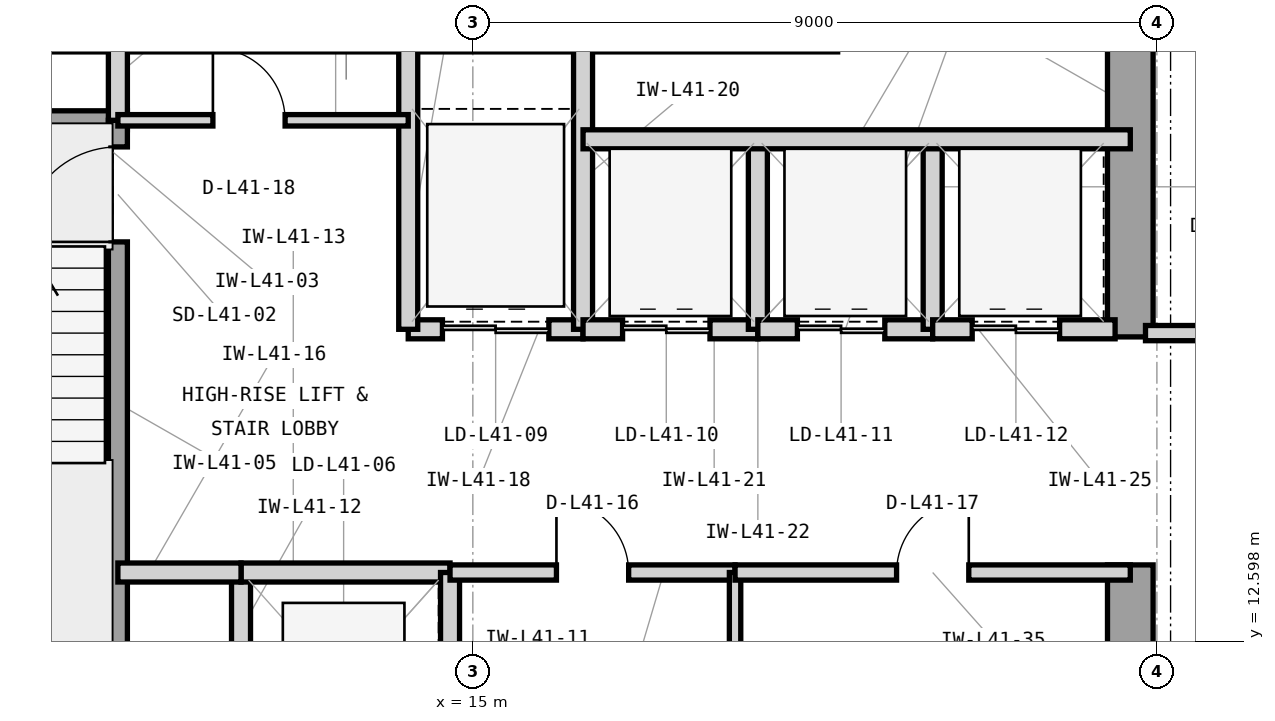
"""IFC4 building model, lengths in metres.
Left out: names, types, materials, properties, quantities, classifications, styles, units other than length and angle.
Written with IfcOpenShell. Run it as: python <this file> out.ifc"""

import sys

from ifc_helpers import new_model, si_unit, direction, frame, frame_2d, origin, place, context, subcontext, project, spatial, rectangle, extrude, element, fill, save


model = new_model("IFC4")
c1 = context("Model", 3, precision=1e-05, world=origin(), true_north=direction((0.0, 1.0)))
c2 = subcontext(c1, "Body", "Model", "MODEL_VIEW")
j1 = project(units=[si_unit("LENGTHUNIT", "METRE"), si_unit("PLANEANGLEUNIT", "RADIAN")], contexts=[c1])
p1 = place(None, origin())
s1 = spatial("IfcSite", under=j1, at=p1, CompositionType="ELEMENT")
p2 = place(p1, origin())
s2 = spatial("IfcBuilding", under=s1, at=p2, CompositionType="ELEMENT")
p3 = place(p2, frame((0.0, 0.0, 172.2)))
s3 = spatial("IfcBuildingStorey", under=s2, at=p3, CompositionType="ELEMENT", Elevation=172.2)
p4 = place(p3, frame((7.475, 20.65, 0.0), z_axis=(0.0, 0.0, 1.0), x_axis=(1.0, 0.0, 0.0)))
e1 = element("IfcWall", 1, at=p4, inside=s3, PredefinedType="SHEAR", context=c2, shape_type="SweptSolid", body=[
    extrude(rectangle(XDim=12.325, YDim=0.6, at=frame_2d((6.163, 0.0))), origin(), (0.0, 0.0, 1.0), 3.9),
])
p5 = place(p3, frame((23.65, 10.4, 0.0), z_axis=(0.0, 0.0, 1.0), x_axis=(0.0, 1.0, 0.0)))
e2 = element("IfcWall", 2, at=p5, inside=s3, PredefinedType="SHEAR", context=c2, shape_type="SweptSolid", body=[
    extrude(rectangle(XDim=3.2, YDim=0.6, at=frame_2d((1.6, 0.0))), origin(), (0.0, 0.0, 1.0), 3.9),
])
p6 = place(p3, frame((23.65, 16.6, 0.0), z_axis=(0.0, 0.0, 1.0), x_axis=(0.0, 1.0, 0.0)))
e3 = element("IfcWall", 3, at=p6, inside=s3, PredefinedType="SHEAR", context=c2, shape_type="SweptSolid", body=[
    extrude(rectangle(XDim=4.05, YDim=0.6, at=frame_2d((2.025, 0.0))), origin(), (0.0, 0.0, 1.0), 3.9),
])
p7 = place(p3, frame((7.7, 19.45, 0.0), z_axis=(0.0, 0.0, 1.0), x_axis=(1.0, 0.0, 0.0)))
e4 = element("IfcWall", 4, at=p7, inside=s3, PredefinedType="SHEAR", context=c2, shape_type="SweptSolid", body=[
    extrude(rectangle(XDim=2.755, YDim=0.25, at=frame_2d((1.377, 0.0))), origin(), (0.0, 0.0, 1.0), 3.9),
])
p8 = place(p3, frame((10.33, 12.0, 0.0), z_axis=(0.0, 0.0, 1.0), x_axis=(0.0, 1.0, 0.0)))
e5 = element("IfcWall", 5, at=p8, inside=s3, PredefinedType="SHEAR", context=c2, shape_type="SweptSolid", body=[
    extrude(rectangle(XDim=7.45, YDim=0.25, at=frame_2d((3.725, 0.0))), origin(), (0.0, 0.0, 1.0), 3.9),
])
p9 = place(p8, frame((5.85, 0.0, 0.0)))
e6 = element("IfcOpeningElement", 6, at=p9, cuts=e5, PredefinedType="OPENING", context=c2, shape_type="SweptSolid", body=[
    extrude(rectangle(XDim=1.25, YDim=2.2, at=frame_2d((0.625, 1.1))), frame((0.0, 0.135, 0.0), z_axis=(0.0, -1.0, 0.0), x_axis=(1.0, 0.0, 0.0)), (0.0, 0.0, 1.0), 0.27),
])
p10 = place(p3, frame((10.33, 19.45, 0.0), z_axis=(0.0, 0.0, 1.0), x_axis=(0.0, 1.0, 0.0)))
e7 = element("IfcWall", 7, at=p10, inside=s3, PredefinedType="PARTITIONING", context=c2, shape_type="SweptSolid", body=[
    extrude(rectangle(XDim=1.2, YDim=0.25, at=frame_2d((0.6, 0.0))), origin(), (0.0, 0.0, 1.0), 3.073),
])
p11 = place(p3, frame((11.95, 10.5, 0.0), z_axis=(0.0, 0.0, 1.0), x_axis=(0.0, 1.0, 0.0)))
e8 = element("IfcWall", 8, at=p11, inside=s3, PredefinedType="PARTITIONING", context=c2, shape_type="SweptSolid", body=[
    extrude(rectangle(XDim=3.0, YDim=0.25, at=frame_2d((1.5, 0.0))), origin(), (0.0, 0.0, 1.0), 3.69),
])
p12 = place(p3, frame((11.95, 13.5, 0.0), z_axis=(0.0, 0.0, 1.0), x_axis=(1.0, 0.0, 0.0)))
e9 = element("IfcWall", 9, at=p12, inside=s3, PredefinedType="PARTITIONING", context=c2, shape_type="SweptSolid", body=[
    extrude(rectangle(XDim=2.75, YDim=0.25, at=frame_2d((1.375, 0.0))), origin(), (0.0, 0.0, 1.0), 3.283),
])
p13 = place(p3, frame((14.7, 10.5, 0.0), z_axis=(0.0, 0.0, 1.0), x_axis=(0.0, 1.0, 0.0)))
e10 = element("IfcWall", 10, at=p13, inside=s3, PredefinedType="PARTITIONING", context=c2, shape_type="SweptSolid", body=[
    extrude(rectangle(XDim=3.0, YDim=0.25, at=frame_2d((1.5, 0.0))), origin(), (0.0, 0.0, 1.0), 3.69),
])
p14 = place(p3, frame((10.33, 13.5, 0.0), z_axis=(0.0, 0.0, 1.0), x_axis=(1.0, 0.0, 0.0)))
e11 = element("IfcWall", 11, at=p14, inside=s3, PredefinedType="PARTITIONING", context=c2, shape_type="SweptSolid", body=[
    extrude(rectangle(XDim=1.62, YDim=0.25, at=frame_2d((0.81, 0.0))), origin(), (0.0, 0.0, 1.0), 3.283),
])
p15 = place(p3, frame((14.15, 16.7, 0.0), z_axis=(0.0, 0.0, 1.0), x_axis=(1.0, 0.0, 0.0)))
e12 = element("IfcWall", 12, at=p15, inside=s3, PredefinedType="PARTITIONING", context=c2, shape_type="SweptSolid", body=[
    extrude(rectangle(XDim=2.3, YDim=0.25, at=frame_2d((1.15, 0.0))), origin(), (0.0, 0.0, 1.0), 3.283),
])
p16 = place(p15, frame((0.45, 0.0, 0.0)))
e13 = element("IfcOpeningElement", 13, at=p16, cuts=e12, PredefinedType="OPENING", context=c2, shape_type="SweptSolid", body=[
    extrude(rectangle(XDim=1.4, YDim=2.35, at=frame_2d((0.7, 1.175))), frame((0.0, 0.135, 0.0), z_axis=(0.0, -1.0, 0.0), x_axis=(1.0, 0.0, 0.0)), (0.0, 0.0, 1.0), 0.27),
])
for number, where, z_axis, x_axis in (
    (14, (14.15, 16.7, 0.0), (0.0, 0.0, 1.0), (0.0, 1.0, 0.0)),
    (15, (16.45, 16.7, 0.0), (0.0, 0.0, 1.0), (0.0, 1.0, 0.0)),
):
    element("IfcWall", number, at=place(p3, frame(where, z_axis=z_axis, x_axis=x_axis)), inside=s3, PredefinedType="PARTITIONING", context=c2, shape_type="SweptSolid", body=[
        extrude(rectangle(XDim=3.95, YDim=0.25, at=frame_2d((1.975, 0.0))), origin(), (0.0, 0.0, 1.0), 3.69),
    ])
p17 = place(p3, frame((16.45, 16.7, 0.0), z_axis=(0.0, 0.0, 1.0), x_axis=(1.0, 0.0, 0.0)))
e16 = element("IfcWall", 16, at=p17, inside=s3, PredefinedType="PARTITIONING", context=c2, shape_type="SweptSolid", body=[
    extrude(rectangle(XDim=2.3, YDim=0.25, at=frame_2d((1.15, 0.0))), origin(), (0.0, 0.0, 1.0), 3.283),
])
p18 = place(p17, frame((0.52, 0.0, 0.0)))
e17 = element("IfcOpeningElement", 17, at=p18, cuts=e16, PredefinedType="OPENING", context=c2, shape_type="SweptSolid", body=[
    extrude(rectangle(XDim=1.15, YDim=2.25, at=frame_2d((0.575, 1.125))), frame((0.0, 0.135, 0.0), z_axis=(0.0, -1.0, 0.0), x_axis=(1.0, 0.0, 0.0)), (0.0, 0.0, 1.0), 0.27),
])
p19 = place(p3, frame((18.75, 16.7, 0.0), z_axis=(0.0, 0.0, 1.0), x_axis=(0.0, 1.0, 0.0)))
e18 = element("IfcWall", 18, at=p19, inside=s3, PredefinedType="PARTITIONING", context=c2, shape_type="SweptSolid", body=[
    extrude(rectangle(XDim=2.5, YDim=0.25, at=frame_2d((1.25, 0.0))), origin(), (0.0, 0.0, 1.0), 3.69),
])
p20 = place(p3, frame((18.75, 16.7, 0.0), z_axis=(0.0, 0.0, 1.0), x_axis=(1.0, 0.0, 0.0)))
e19 = element("IfcWall", 19, at=p20, inside=s3, PredefinedType="PARTITIONING", context=c2, shape_type="SweptSolid", body=[
    extrude(rectangle(XDim=2.3, YDim=0.25, at=frame_2d((1.15, 0.0))), origin(), (0.0, 0.0, 1.0), 3.283),
])
p21 = place(p20, frame((0.52, 0.0, 0.0)))
e20 = element("IfcOpeningElement", 20, at=p21, cuts=e19, PredefinedType="OPENING", context=c2, shape_type="SweptSolid", body=[
    extrude(rectangle(XDim=1.15, YDim=2.25, at=frame_2d((0.575, 1.125))), frame((0.0, 0.135, 0.0), z_axis=(0.0, -1.0, 0.0), x_axis=(1.0, 0.0, 0.0)), (0.0, 0.0, 1.0), 0.27),
])
p22 = place(p3, frame((21.05, 16.7, 0.0), z_axis=(0.0, 0.0, 1.0), x_axis=(0.0, 1.0, 0.0)))
e21 = element("IfcWall", 21, at=p22, inside=s3, PredefinedType="PARTITIONING", context=c2, shape_type="SweptSolid", body=[
    extrude(rectangle(XDim=2.5, YDim=0.25, at=frame_2d((1.25, 0.0))), origin(), (0.0, 0.0, 1.0), 3.69),
])
p23 = place(p3, frame((21.05, 16.7, 0.0), z_axis=(0.0, 0.0, 1.0), x_axis=(1.0, 0.0, 0.0)))
e22 = element("IfcWall", 22, at=p23, inside=s3, PredefinedType="PARTITIONING", context=c2, shape_type="SweptSolid", body=[
    extrude(rectangle(XDim=2.4, YDim=0.25, at=frame_2d((1.2, 0.0))), origin(), (0.0, 0.0, 1.0), 3.283),
])
p24 = place(p23, frame((0.52, 0.0, 0.0)))
e23 = element("IfcOpeningElement", 23, at=p24, cuts=e22, PredefinedType="OPENING", context=c2, shape_type="SweptSolid", body=[
    extrude(rectangle(XDim=1.15, YDim=2.25, at=frame_2d((0.575, 1.125))), frame((0.0, 0.135, 0.0), z_axis=(0.0, -1.0, 0.0), x_axis=(1.0, 0.0, 0.0)), (0.0, 0.0, 1.0), 0.27),
])
p25 = place(p3, frame((16.45, 19.2, 0.0), z_axis=(0.0, 0.0, 1.0), x_axis=(1.0, 0.0, 0.0)))
e24 = element("IfcWall", 24, at=p25, inside=s3, PredefinedType="PARTITIONING", context=c2, shape_type="SweptSolid", body=[
    extrude(rectangle(XDim=7.2, YDim=0.25, at=frame_2d((3.6, 0.0))), origin(), (0.0, 0.0, 1.0), 3.69),
])
p26 = place(p3, frame((14.7, 13.5, 0.0), z_axis=(0.0, 0.0, 1.0), x_axis=(1.0, 0.0, 0.0)))
e25 = element("IfcWall", 25, at=p26, inside=s3, PredefinedType="PARTITIONING", context=c2, shape_type="SweptSolid", body=[
    extrude(rectangle(XDim=3.75, YDim=0.2, at=frame_2d((1.875, 0.0))), origin(), (0.0, 0.0, 1.0), 3.283),
])
p27 = place(p26, frame((1.4, 0.0, 0.0)))
e26 = element("IfcOpeningElement", 26, at=p27, cuts=e25, PredefinedType="OPENING", context=c2, shape_type="SweptSolid", body=[
    extrude(rectangle(XDim=0.95, YDim=2.1, at=frame_2d((0.475, 1.05))), frame((0.0, 0.11, 0.0), z_axis=(0.0, -1.0, 0.0), x_axis=(1.0, 0.0, 0.0)), (0.0, 0.0, 1.0), 0.22),
])
p28 = place(p3, frame((18.45, 10.28, 0.0), z_axis=(0.0, 0.0, 1.0), x_axis=(0.0, 1.0, 0.0)))
e27 = element("IfcWall", 27, at=p28, inside=s3, PredefinedType="PARTITIONING", context=c2, shape_type="SweptSolid", body=[
    extrude(rectangle(XDim=3.22, YDim=0.15, at=frame_2d((1.61, 0.0))), origin(), (0.0, 0.0, 1.0), 3.69),
])
p29 = place(p3, frame((18.45, 13.5, 0.0), z_axis=(0.0, 0.0, 1.0), x_axis=(1.0, 0.0, 0.0)))
e28 = element("IfcWall", 28, at=p29, inside=s3, PredefinedType="PARTITIONING", context=c2, shape_type="SweptSolid", body=[
    extrude(rectangle(XDim=5.2, YDim=0.2, at=frame_2d((2.6, 0.0))), origin(), (0.0, 0.0, 1.0), 3.283),
])
p30 = place(p29, frame((2.125, 0.0, 0.0)))
e29 = element("IfcOpeningElement", 29, at=p30, cuts=e28, PredefinedType="OPENING", context=c2, shape_type="SweptSolid", body=[
    extrude(rectangle(XDim=0.95, YDim=2.1, at=frame_2d((0.475, 1.05))), frame((0.0, 0.11, 0.0), z_axis=(0.0, -1.0, 0.0), x_axis=(1.0, 0.0, 0.0)), (0.0, 0.0, 1.0), 0.22),
])
p31 = place(p3, frame((10.33, 19.45, 0.0), z_axis=(0.0, 0.0, 1.0), x_axis=(1.0, 0.0, 0.0)))
e30 = element("IfcWall", 30, at=p31, inside=s3, PredefinedType="PARTITIONING", context=c2, shape_type="SweptSolid", body=[
    extrude(rectangle(XDim=3.82, YDim=0.15, at=frame_2d((1.91, 0.0))), origin(), (0.0, 0.0, 1.0), 3.69),
])
p32 = place(p31, frame((1.25, 0.0, 0.0)))
e31 = element("IfcOpeningElement", 31, at=p32, cuts=e30, PredefinedType="OPENING", context=c2, shape_type="SweptSolid", body=[
    extrude(rectangle(XDim=0.95, YDim=2.1, at=frame_2d((0.475, 1.05))), frame((0.0, 0.085, 0.0), z_axis=(0.0, -1.0, 0.0), x_axis=(1.0, 0.0, 0.0)), (0.0, 0.0, 1.0), 0.17),
])
p33 = place(p3, frame((23.85, 16.65, 0.0), z_axis=(0.0, 0.0, 1.0), x_axis=(1.0, 0.0, 0.0)))
e32 = element("IfcWall", 32, at=p33, inside=s3, PredefinedType="PARTITIONING", context=c2, shape_type="SweptSolid", body=[
    extrude(rectangle(XDim=2.85, YDim=0.2, at=frame_2d((1.425, 0.0))), origin(), (0.0, 0.0, 1.0), 3.69),
])
p34 = place(p33, frame((0.7, 0.0, 0.0)))
e33 = element("IfcOpeningElement", 33, at=p34, cuts=e32, PredefinedType="OPENING", context=c2, shape_type="SweptSolid", body=[
    extrude(rectangle(XDim=1.0, YDim=2.15, at=frame_2d((0.5, 1.075))), frame((0.0, 0.11, 0.0), z_axis=(0.0, -1.0, 0.0), x_axis=(1.0, 0.0, 0.0)), (0.0, 0.0, 1.0), 0.22),
])
p35 = place(p9, origin())
e34 = element("IfcDoor", 34, at=p35, inside=s3, OperationType="SINGLE_SWING_LEFT", PredefinedType="DOOR", context=c2, shape_type="SweptSolid", body=[
    extrude(rectangle(XDim=1.25, YDim=2.2, at=frame_2d((0.625, 1.1))), frame((0.0, 0.025, 0.0), z_axis=(0.0, -1.0, 0.0), x_axis=(1.0, 0.0, 0.0)), (0.0, 0.0, 1.0), 0.05),
])
fill(e6, e34)
p36 = place(p16, origin())
e35 = element("IfcDoor", 35, at=p36, inside=s3, OperationType="DOUBLE_DOOR_SLIDING", PredefinedType="DOOR", context=c2, shape_type="SweptSolid", body=[
    extrude(rectangle(XDim=1.4, YDim=2.35, at=frame_2d((0.7, 1.175))), frame((0.0, 0.025, 0.0), z_axis=(0.0, -1.0, 0.0), x_axis=(1.0, 0.0, 0.0)), (0.0, 0.0, 1.0), 0.05),
])
fill(e13, e35)
p37 = place(p18, origin())
e36 = element("IfcDoor", 36, at=p37, inside=s3, OperationType="DOUBLE_DOOR_SLIDING", PredefinedType="DOOR", context=c2, shape_type="SweptSolid", body=[
    extrude(rectangle(XDim=1.15, YDim=2.25, at=frame_2d((0.575, 1.125))), frame((0.0, 0.025, 0.0), z_axis=(0.0, -1.0, 0.0), x_axis=(1.0, 0.0, 0.0)), (0.0, 0.0, 1.0), 0.05),
])
fill(e17, e36)
p38 = place(p21, origin())
e37 = element("IfcDoor", 37, at=p38, inside=s3, OperationType="DOUBLE_DOOR_SLIDING", PredefinedType="DOOR", context=c2, shape_type="SweptSolid", body=[
    extrude(rectangle(XDim=1.15, YDim=2.25, at=frame_2d((0.575, 1.125))), frame((0.0, 0.025, 0.0), z_axis=(0.0, -1.0, 0.0), x_axis=(1.0, 0.0, 0.0)), (0.0, 0.0, 1.0), 0.05),
])
fill(e20, e37)
p39 = place(p24, origin())
e38 = element("IfcDoor", 38, at=p39, inside=s3, OperationType="DOUBLE_DOOR_SLIDING", PredefinedType="DOOR", context=c2, shape_type="SweptSolid", body=[
    extrude(rectangle(XDim=1.15, YDim=2.25, at=frame_2d((0.575, 1.125))), frame((0.0, 0.025, 0.0), z_axis=(0.0, -1.0, 0.0), x_axis=(1.0, 0.0, 0.0)), (0.0, 0.0, 1.0), 0.05),
])
fill(e23, e38)
p40 = place(p27, origin())
e39 = element("IfcDoor", 39, at=p40, inside=s3, OperationType="SINGLE_SWING_LEFT", PredefinedType="DOOR", context=c2, shape_type="SweptSolid", body=[
    extrude(rectangle(XDim=0.95, YDim=2.1, at=frame_2d((0.475, 1.05))), frame((0.0, 0.025, 0.0), z_axis=(0.0, -1.0, 0.0), x_axis=(1.0, 0.0, 0.0)), (0.0, 0.0, 1.0), 0.05),
])
fill(e26, e39)
p41 = place(p30, origin())
e40 = element("IfcDoor", 40, at=p41, inside=s3, OperationType="SINGLE_SWING_RIGHT", PredefinedType="DOOR", context=c2, shape_type="SweptSolid", body=[
    extrude(rectangle(XDim=0.95, YDim=2.1, at=frame_2d((0.475, 1.05))), frame((0.0, 0.025, 0.0), z_axis=(0.0, -1.0, 0.0), x_axis=(1.0, 0.0, 0.0)), (0.0, 0.0, 1.0), 0.05),
])
fill(e29, e40)
p42 = place(p32, origin())
e41 = element("IfcDoor", 41, at=p42, inside=s3, OperationType="SINGLE_SWING_LEFT", PredefinedType="DOOR", context=c2, shape_type="SweptSolid", body=[
    extrude(rectangle(XDim=0.95, YDim=2.1, at=frame_2d((0.475, 1.05))), frame((0.0, 0.025, 0.0), z_axis=(0.0, -1.0, 0.0), x_axis=(1.0, 0.0, 0.0)), (0.0, 0.0, 1.0), 0.05),
])
fill(e31, e41)
save(model, sys.argv[1])
